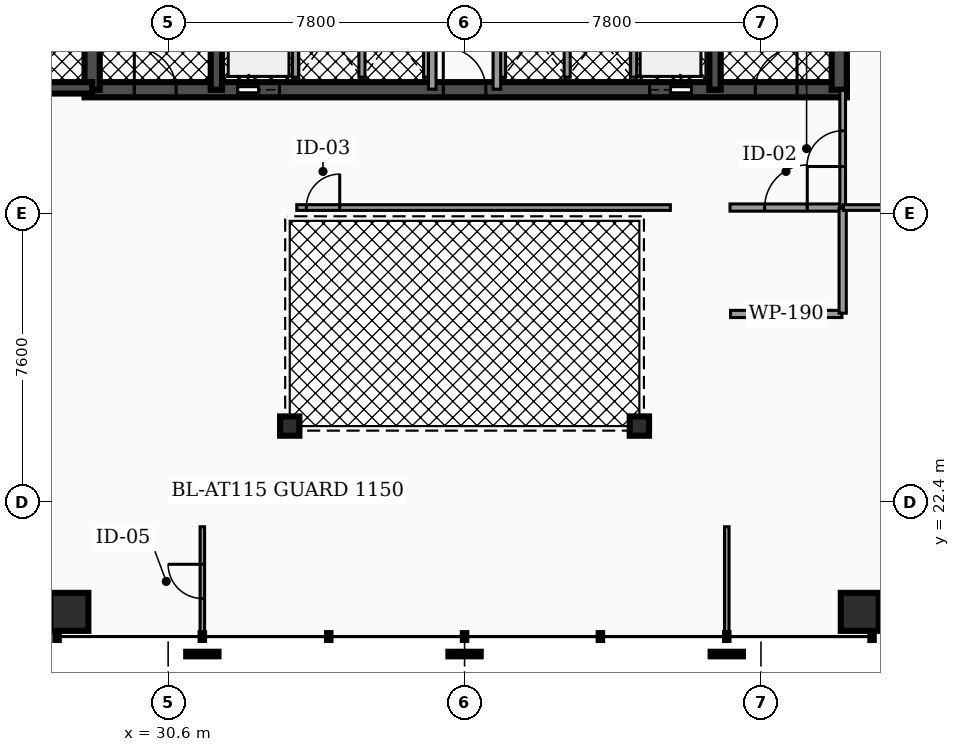
"""IFC4 building model, lengths in metres.
Left out: names, types, materials, properties, quantities, classifications, styles, units other than length and angle.
Written with IfcOpenShell. Run it as: python <this file> out.ifc"""

import sys

from ifc_helpers import new_model, si_unit, direction, frame, frame_2d, origin, origin_2d, place, context, subcontext, project, spatial, rectangle, hollow_rectangle, hollow_circle, extrude, element, fill, save


model = new_model("IFC4")
c1 = context("Model", 3, precision=1e-05, world=origin(), true_north=direction((0.0, 1.0)))
c2 = subcontext(c1, "Body", "Model", "MODEL_VIEW")
j1 = project(units=[si_unit("LENGTHUNIT", "METRE"), si_unit("PLANEANGLEUNIT", "RADIAN")], contexts=[c1])
p1 = place(None, origin())
s1 = spatial("IfcSite", under=j1, at=p1, CompositionType="ELEMENT")
p2 = place(p1, origin())
s2 = spatial("IfcBuilding", under=s1, at=p2, CompositionType="ELEMENT")
p3 = place(p2, frame((0.0, 0.0, 56.1)))
s3 = spatial("IfcBuildingStorey", under=s2, at=p3, CompositionType="ELEMENT", Elevation=56.1)
p4 = place(p3, frame((28.4, 33.25, 0.0), z_axis=(0.0, 0.0, 1.0), x_axis=(1.0, 0.0, 0.0)))
e1 = element("IfcWall", 1, at=p4, inside=s3, PredefinedType="SHEAR", context=c2, shape_type="SweptSolid", body=[
    extrude(rectangle(XDim=20.06, YDim=0.4, at=frame_2d((10.03, 0.0))), origin(), (0.0, 0.0, 1.0), 3.82),
])
p5 = place(p4, frame((4.03, 0.0, 0.0)))
e2 = element("IfcOpeningElement", 2, at=p5, cuts=e1, PredefinedType="OPENING", context=c2, shape_type="SweptSolid", body=[
    extrude(rectangle(XDim=1.1, YDim=2.15, at=frame_2d((0.55, 1.075))), frame((0.0, 0.21, 0.0), z_axis=(0.0, -1.0, 0.0), x_axis=(1.0, 0.0, 0.0)), (0.0, 0.0, 1.0), 0.42),
])
p6 = place(p4, frame((14.87, 0.0, 0.0)))
e3 = element("IfcOpeningElement", 3, at=p6, cuts=e1, PredefinedType="OPENING", context=c2, shape_type="SweptSolid", body=[
    extrude(rectangle(XDim=1.1, YDim=2.15, at=frame_2d((0.55, 1.075))), frame((0.0, 0.21, 0.0), z_axis=(0.0, -1.0, 0.0), x_axis=(1.0, 0.0, 0.0)), (0.0, 0.0, 1.0), 0.42),
])
p7 = place(p4, frame((1.31, 0.0, 0.0)))
e4 = element("IfcOpeningElement", 4, at=p7, cuts=e1, PredefinedType="OPENING", context=c2, shape_type="SweptSolid", body=[
    extrude(rectangle(XDim=1.1, YDim=2.2, at=frame_2d((0.55, 1.1))), frame((0.0, 0.21, 0.0), z_axis=(0.0, -1.0, 0.0), x_axis=(1.0, 0.0, 0.0)), (0.0, 0.0, 1.0), 0.42),
])
p8 = place(p4, frame((9.44, 0.0, 0.0)))
e5 = element("IfcOpeningElement", 5, at=p8, cuts=e1, PredefinedType="OPENING", context=c2, shape_type="SweptSolid", body=[
    extrude(rectangle(XDim=1.12, YDim=2.05, at=frame_2d((0.56, 1.025))), frame((0.0, 0.21, 0.0), z_axis=(0.0, -1.0, 0.0), x_axis=(1.0, 0.0, 0.0)), (0.0, 0.0, 1.0), 0.42),
])
p9 = place(p4, frame((17.65, 0.0, 0.0)))
e6 = element("IfcOpeningElement", 6, at=p9, cuts=e1, PredefinedType="OPENING", context=c2, shape_type="SweptSolid", body=[
    extrude(rectangle(XDim=1.1, YDim=2.2, at=frame_2d((0.55, 1.1))), frame((0.0, 0.21, 0.0), z_axis=(0.0, -1.0, 0.0), x_axis=(1.0, 0.0, 0.0)), (0.0, 0.0, 1.0), 0.42),
])
p10 = place(p3, frame((28.6, 33.25, 0.0), z_axis=(0.0, 0.0, 1.0), x_axis=(0.0, 1.0, 0.0)))
e7 = element("IfcWall", 7, at=p10, inside=s3, PredefinedType="SHEAR", context=c2, shape_type="SweptSolid", body=[
    extrude(rectangle(XDim=10.2, YDim=0.4, at=frame_2d((5.1, 0.0))), origin(), (0.0, 0.0, 1.0), 3.82),
])
for number, where, z_axis, x_axis in (
    (8, (31.87, 33.25, 0.0), (0.0, 0.0, 1.0), (0.0, 1.0, 0.0)),
    (9, (44.99, 33.25, 0.0), (0.0, 0.0, 1.0), (0.0, 1.0, 0.0)),
):
    element("IfcWall", number, at=place(p3, frame(where, z_axis=z_axis, x_axis=x_axis)), inside=s3, PredefinedType="SHEAR", context=c2, shape_type="SweptSolid", body=[
        extrude(rectangle(XDim=10.2, YDim=0.3, at=frame_2d((5.1, 0.0))), origin(), (0.0, 0.0, 1.0), 3.82),
    ])
p11 = place(p3, frame((48.26, 33.25, 0.0), z_axis=(0.0, 0.0, 1.0), x_axis=(0.0, 1.0, 0.0)))
e10 = element("IfcWall", 10, at=p11, inside=s3, PredefinedType="SHEAR", context=c2, shape_type="SweptSolid", body=[
    extrude(rectangle(XDim=10.2, YDim=0.4, at=frame_2d((5.1, 0.0))), origin(), (0.0, 0.0, 1.0), 3.82),
])
p12 = place(p3, frame((25.08, 33.3, 0.0), z_axis=(0.0, 0.0, 1.0), x_axis=(1.0, 0.0, 0.0)))
e11 = element("IfcWall", 11, at=p12, inside=s3, PredefinedType="SHEAR", context=c2, shape_type="SweptSolid", body=[
    extrude(rectangle(XDim=3.52, YDim=0.3, at=frame_2d((1.76, 0.0))), origin(), (0.0, 0.0, 1.0), 3.82),
])
p13 = place(p12, frame((1.335, 0.0, 0.0)))
e12 = element("IfcOpeningElement", 12, at=p13, cuts=e11, PredefinedType="OPENING", context=c2, shape_type="SweptSolid", body=[
    extrude(rectangle(XDim=0.95, YDim=2.2, at=frame_2d((0.475, 1.1))), frame((0.0, 0.16, 0.0), z_axis=(0.0, -1.0, 0.0), x_axis=(1.0, 0.0, 0.0)), (0.0, 0.0, 1.0), 0.32),
])
for number, where, z_axis, x_axis in (
    (13, (28.0, 19.512, 0.0), (0.0, 0.0, 1.0), (1.0, 0.0, 0.0)),
    (14, (48.8, 19.512, 0.0), (0.0, 0.0, 1.0), (1.0, 0.0, 0.0)),
):
    element("IfcColumn", number, at=place(p3, frame(where, z_axis=z_axis, x_axis=x_axis)), inside=s3, PredefinedType="COLUMN", context=c2, shape_type="SweptSolid", body=[
        extrude(hollow_rectangle(XDim=1.0, YDim=1.0, WallThickness=0.05, at=origin_2d()), origin(), (0.0, 0.0, 1.0), 3.82),
    ])
for number, where, z_axis, x_axis in (
    (15, (33.8, 24.4, 0.0), (0.0, 0.0, 1.0), (1.0, 0.0, 0.0)),
    (16, (43.0, 24.4, 0.0), (0.0, 0.0, 1.0), (1.0, 0.0, 0.0)),
):
    element("IfcColumn", number, at=place(p3, frame(where, z_axis=z_axis, x_axis=x_axis)), inside=s3, PredefinedType="COLUMN", context=c2, shape_type="SweptSolid", body=[
        extrude(hollow_circle(Radius=0.254, WallThickness=0.02, at=origin_2d()), origin(), (0.0, 0.0, 1.0), 3.82),
    ])
for number, where, z_axis, x_axis in (
    (17, (33.95, 33.58, 0.0), (0.0, 0.0, 1.0), (0.0, 1.0, 0.0)),
    (18, (42.85, 33.58, 0.0), (0.0, 0.0, 1.0), (0.0, 1.0, 0.0)),
):
    element("IfcWall", number, at=place(p3, frame(where, z_axis=z_axis, x_axis=x_axis)), inside=s3, PredefinedType="SOLIDWALL", context=c2, shape_type="SweptSolid", body=[
        extrude(rectangle(XDim=2.45, YDim=0.16, at=frame_2d((1.225, 0.0))), origin(), (0.0, 0.0, 1.0), 2.792),
    ])
for number, where, z_axis, x_axis in (
    (19, (35.7, 33.58, 0.0), (0.0, 0.0, 1.0), (0.0, 1.0, 0.0)),
    (20, (37.4, 33.58, 0.0), (0.0, 0.0, 1.0), (0.0, 1.0, 0.0)),
    (21, (39.4, 33.58, 0.0), (0.0, 0.0, 1.0), (0.0, 1.0, 0.0)),
    (22, (41.1, 33.58, 0.0), (0.0, 0.0, 1.0), (0.0, 1.0, 0.0)),
):
    element("IfcWall", number, at=place(p3, frame(where, z_axis=z_axis, x_axis=x_axis)), inside=s3, PredefinedType="SOLIDWALL", context=c2, shape_type="SweptSolid", body=[
        extrude(rectangle(XDim=2.25, YDim=0.16, at=frame_2d((1.125, 0.0))), origin(), (0.0, 0.0, 1.0), 2.792),
    ])
p14 = place(p3, frame((37.55, 33.265, 0.0), z_axis=(0.0, 0.0, 1.0), x_axis=(0.0, 1.0, 0.0)))
e23 = element("IfcWall", 23, at=p14, inside=s3, PredefinedType="PARTITIONING", context=c2, shape_type="SweptSolid", body=[
    extrude(rectangle(XDim=4.265, YDim=0.2, at=frame_2d((2.133, 0.0))), origin(), (0.0, 0.0, 1.0), 2.777),
])
p15 = place(p14, frame((3.093, 0.0, 0.0)))
e24 = element("IfcOpeningElement", 24, at=p15, cuts=e23, PredefinedType="OPENING", context=c2, shape_type="SweptSolid", body=[
    extrude(rectangle(XDim=0.88, YDim=2.05, at=frame_2d((0.44, 1.025))), frame((0.0, 0.11, 0.0), z_axis=(0.0, -1.0, 0.0), x_axis=(1.0, 0.0, 0.0)), (0.0, 0.0, 1.0), 0.22),
])
p16 = place(p3, frame((39.25, 33.265, 0.0), z_axis=(0.0, 0.0, 1.0), x_axis=(0.0, 1.0, 0.0)))
e25 = element("IfcWall", 25, at=p16, inside=s3, PredefinedType="PARTITIONING", context=c2, shape_type="SweptSolid", body=[
    extrude(rectangle(XDim=4.265, YDim=0.2, at=frame_2d((2.133, 0.0))), origin(), (0.0, 0.0, 1.0), 2.777),
])
p17 = place(p16, frame((3.093, 0.0, 0.0)))
e26 = element("IfcOpeningElement", 26, at=p17, cuts=e25, PredefinedType="OPENING", context=c2, shape_type="SweptSolid", body=[
    extrude(rectangle(XDim=0.88, YDim=2.05, at=frame_2d((0.44, 1.025))), frame((0.0, 0.11, 0.0), z_axis=(0.0, -1.0, 0.0), x_axis=(1.0, 0.0, 0.0)), (0.0, 0.0, 1.0), 0.22),
])
p18 = place(p3, frame((45.385, 30.15, 0.0), z_axis=(0.0, 0.0, 1.0), x_axis=(1.0, 0.0, 0.0)))
e27 = element("IfcWall", 27, at=p18, inside=s3, PredefinedType="PARTITIONING", context=c2, shape_type="SweptSolid", body=[
    extrude(rectangle(XDim=2.945, YDim=0.19, at=frame_2d((1.473, 0.0))), origin(), (0.0, 0.0, 1.0), 2.777),
])
p19 = place(p18, frame((0.913, 0.0, 0.0)))
e28 = element("IfcOpeningElement", 28, at=p19, cuts=e27, PredefinedType="OPENING", context=c2, shape_type="SweptSolid", body=[
    extrude(rectangle(XDim=1.12, YDim=2.05, at=frame_2d((0.56, 1.025))), frame((0.0, 0.105, 0.0), z_axis=(0.0, -1.0, 0.0), x_axis=(1.0, 0.0, 0.0)), (0.0, 0.0, 1.0), 0.21),
])
p20 = place(p3, frame((48.35, 30.17, 0.0), z_axis=(0.0, 0.0, 1.0), x_axis=(0.0, 1.0, 0.0)))
e29 = element("IfcWall", 29, at=p20, inside=s3, PredefinedType="PARTITIONING", context=c2, shape_type="SweptSolid", body=[
    extrude(rectangle(XDim=3.06, YDim=0.15, at=frame_2d((1.53, 0.0))), origin(), (0.0, 0.0, 1.0), 2.777),
])
p21 = place(p20, frame((1.06, 0.0, 0.0)))
e30 = element("IfcOpeningElement", 30, at=p21, cuts=e29, PredefinedType="OPENING", context=c2, shape_type="SweptSolid", body=[
    extrude(rectangle(XDim=0.94, YDim=2.05, at=frame_2d((0.47, 1.025))), frame((0.0, 0.085, 0.0), z_axis=(0.0, -1.0, 0.0), x_axis=(1.0, 0.0, 0.0)), (0.0, 0.0, 1.0), 0.17),
])
p22 = place(p3, frame((33.985, 30.15, 0.0), z_axis=(0.0, 0.0, 1.0), x_axis=(1.0, 0.0, 0.0)))
e31 = element("IfcWall", 31, at=p22, inside=s3, PredefinedType="PARTITIONING", context=c2, shape_type="SweptSolid", body=[
    extrude(rectangle(XDim=9.83, YDim=0.15, at=frame_2d((4.915, 0.0))), origin(), (0.0, 0.0, 1.0), 2.777),
])
p23 = place(p22, frame((0.25, 0.0, 0.0)))
e32 = element("IfcOpeningElement", 32, at=p23, cuts=e31, PredefinedType="OPENING", context=c2, shape_type="SweptSolid", body=[
    extrude(rectangle(XDim=0.88, YDim=2.05, at=frame_2d((0.44, 1.025))), frame((0.0, 0.085, 0.0), z_axis=(0.0, -1.0, 0.0), x_axis=(1.0, 0.0, 0.0)), (0.0, 0.0, 1.0), 0.17),
])
p24 = place(p3, frame((45.4, 27.35, 0.0), z_axis=(0.0, 0.0, 1.0), x_axis=(1.0, 0.0, 0.0)))
e33 = element("IfcWall", 33, at=p24, inside=s3, PredefinedType="PARTITIONING", context=c2, shape_type="SweptSolid", body=[
    extrude(rectangle(XDim=2.93, YDim=0.19, at=frame_2d((1.465, 0.0))), origin(), (0.0, 0.0, 1.0), 2.777),
])
p25 = place(p3, frame((48.35, 27.37, 0.0), z_axis=(0.0, 0.0, 1.0), x_axis=(0.0, 1.0, 0.0)))
e34 = element("IfcWall", 34, at=p25, inside=s3, PredefinedType="PARTITIONING", context=c2, shape_type="SweptSolid", body=[
    extrude(rectangle(XDim=2.76, YDim=0.19, at=frame_2d((1.38, 0.0))), origin(), (0.0, 0.0, 1.0), 2.777),
])
p26 = place(p3, frame((48.37, 30.15, 0.0), z_axis=(0.0, 0.0, 1.0), x_axis=(1.0, 0.0, 0.0)))
e35 = element("IfcWall", 35, at=p26, inside=s3, PredefinedType="PARTITIONING", context=c2, shape_type="SweptSolid", body=[
    extrude(rectangle(XDim=2.06, YDim=0.15, at=frame_2d((1.03, 0.0))), origin(), (0.0, 0.0, 1.0), 2.777),
])
p27 = place(p3, frame((31.5, 18.877, 0.0), z_axis=(0.0, 0.0, 1.0), x_axis=(0.0, 1.0, 0.0)))
e36 = element("IfcWall", 36, at=p27, inside=s3, PredefinedType="PARTITIONING", context=c2, shape_type="SweptSolid", body=[
    extrude(rectangle(XDim=2.873, YDim=0.12, at=frame_2d((1.437, 0.0))), origin(), (0.0, 0.0, 1.0), 2.777),
])
p28 = place(p27, frame((0.987, 0.0, 0.0)))
e37 = element("IfcOpeningElement", 37, at=p28, cuts=e36, PredefinedType="OPENING", context=c2, shape_type="SweptSolid", body=[
    extrude(rectangle(XDim=0.9, YDim=2.05, at=frame_2d((0.45, 1.025))), frame((0.0, 0.07, 0.0), z_axis=(0.0, -1.0, 0.0), x_axis=(1.0, 0.0, 0.0)), (0.0, 0.0, 1.0), 0.14),
])
p29 = place(p3, frame((45.3, 18.877, 0.0), z_axis=(0.0, 0.0, 1.0), x_axis=(0.0, 1.0, 0.0)))
e38 = element("IfcWall", 38, at=p29, inside=s3, PredefinedType="PARTITIONING", context=c2, shape_type="SweptSolid", body=[
    extrude(rectangle(XDim=2.873, YDim=0.12, at=frame_2d((1.437, 0.0))), origin(), (0.0, 0.0, 1.0), 2.777),
])
p30 = place(p5, origin())
e39 = element("IfcDoor", 39, at=p30, inside=s3, OperationType="SLIDING_TO_LEFT", PredefinedType="DOOR", context=c2, shape_type="SweptSolid", body=[
    extrude(rectangle(XDim=1.1, YDim=2.15, at=frame_2d((0.55, 1.075))), frame((0.0, 0.025, 0.0), z_axis=(0.0, -1.0, 0.0), x_axis=(1.0, 0.0, 0.0)), (0.0, 0.0, 1.0), 0.05),
])
fill(e2, e39)
p31 = place(p6, origin())
e40 = element("IfcDoor", 40, at=p31, inside=s3, OperationType="SLIDING_TO_RIGHT", PredefinedType="DOOR", context=c2, shape_type="SweptSolid", body=[
    extrude(rectangle(XDim=1.1, YDim=2.15, at=frame_2d((0.55, 1.075))), frame((0.0, 0.025, 0.0), z_axis=(0.0, -1.0, 0.0), x_axis=(1.0, 0.0, 0.0)), (0.0, 0.0, 1.0), 0.05),
])
fill(e3, e40)
p32 = place(p7, origin())
e41 = element("IfcDoor", 41, at=p32, inside=s3, OperationType="SINGLE_SWING_LEFT", PredefinedType="DOOR", context=c2, shape_type="SweptSolid", body=[
    extrude(rectangle(XDim=1.1, YDim=2.2, at=frame_2d((0.55, 1.1))), frame((0.0, 0.025, 0.0), z_axis=(0.0, -1.0, 0.0), x_axis=(1.0, 0.0, 0.0)), (0.0, 0.0, 1.0), 0.05),
])
fill(e4, e41)
p33 = place(p8, origin())
e42 = element("IfcDoor", 42, at=p33, inside=s3, OperationType="SINGLE_SWING_LEFT", PredefinedType="DOOR", context=c2, shape_type="SweptSolid", body=[
    extrude(rectangle(XDim=1.12, YDim=2.05, at=frame_2d((0.56, 1.025))), frame((0.0, 0.025, 0.0), z_axis=(0.0, -1.0, 0.0), x_axis=(1.0, 0.0, 0.0)), (0.0, 0.0, 1.0), 0.05),
])
fill(e5, e42)
p34 = place(p9, origin())
e43 = element("IfcDoor", 43, at=p34, inside=s3, OperationType="SINGLE_SWING_RIGHT", PredefinedType="DOOR", context=c2, shape_type="SweptSolid", body=[
    extrude(rectangle(XDim=1.1, YDim=2.2, at=frame_2d((0.55, 1.1))), frame((0.0, 0.025, 0.0), z_axis=(0.0, -1.0, 0.0), x_axis=(1.0, 0.0, 0.0)), (0.0, 0.0, 1.0), 0.05),
])
fill(e6, e43)
p35 = place(p19, origin())
e44 = element("IfcDoor", 44, at=p35, inside=s3, OperationType="SINGLE_SWING_RIGHT", PredefinedType="DOOR", context=c2, shape_type="SweptSolid", body=[
    extrude(rectangle(XDim=1.12, YDim=2.05, at=frame_2d((0.56, 1.025))), frame((0.0, 0.025, 0.0), z_axis=(0.0, -1.0, 0.0), x_axis=(1.0, 0.0, 0.0)), (0.0, 0.0, 1.0), 0.05),
])
fill(e28, e44)
p36 = place(p21, origin())
e45 = element("IfcDoor", 45, at=p36, inside=s3, OperationType="SINGLE_SWING_LEFT", PredefinedType="DOOR", context=c2, shape_type="SweptSolid", body=[
    extrude(rectangle(XDim=0.94, YDim=2.05, at=frame_2d((0.47, 1.025))), frame((0.0, 0.025, 0.0), z_axis=(0.0, -1.0, 0.0), x_axis=(1.0, 0.0, 0.0)), (0.0, 0.0, 1.0), 0.05),
])
fill(e30, e45)
p37 = place(p23, origin())
e46 = element("IfcDoor", 46, at=p37, inside=s3, OperationType="SINGLE_SWING_RIGHT", PredefinedType="DOOR", context=c2, shape_type="SweptSolid", body=[
    extrude(rectangle(XDim=0.88, YDim=2.05, at=frame_2d((0.44, 1.025))), frame((0.0, 0.025, 0.0), z_axis=(0.0, -1.0, 0.0), x_axis=(1.0, 0.0, 0.0)), (0.0, 0.0, 1.0), 0.05),
])
fill(e32, e46)
p38 = place(p28, origin())
e47 = element("IfcDoor", 47, at=p38, inside=s3, OperationType="SINGLE_SWING_RIGHT", PredefinedType="DOOR", context=c2, shape_type="SweptSolid", body=[
    extrude(rectangle(XDim=0.9, YDim=2.05, at=frame_2d((0.45, 1.025))), frame((0.0, 0.025, 0.0), z_axis=(0.0, -1.0, 0.0), x_axis=(1.0, 0.0, 0.0)), (0.0, 0.0, 1.0), 0.05),
])
fill(e37, e47)
save(model, sys.argv[1])
